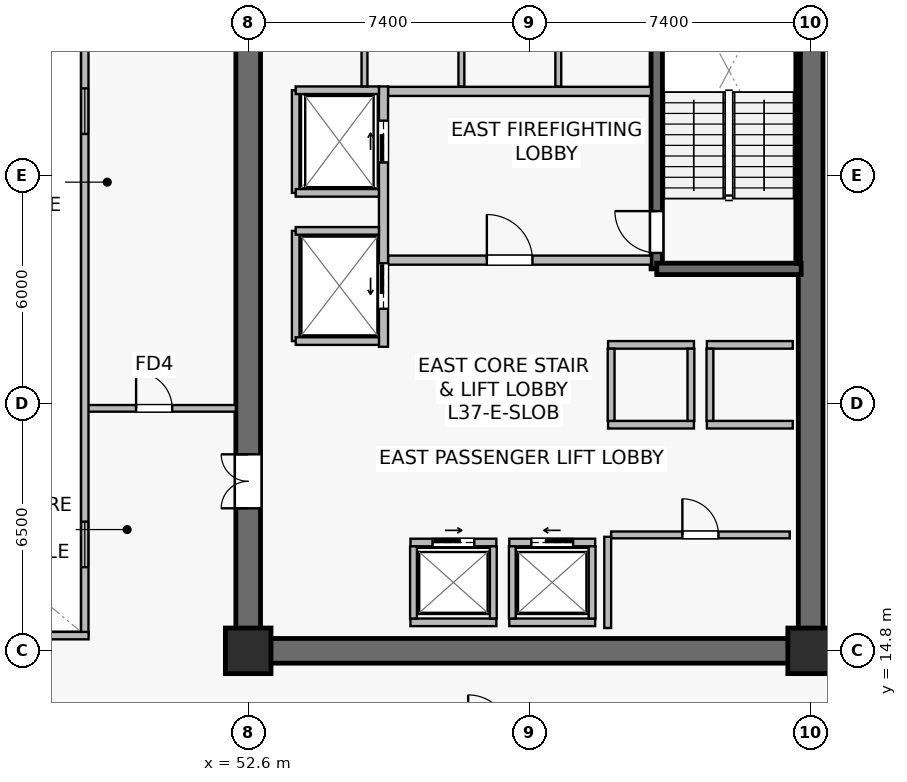
"""IFC4 building model, lengths in metres.
Left out: names, types, materials, properties, quantities, classifications, styles, units other than length and angle.
Written with IfcOpenShell. Run it as: python <this file> out.ifc"""

import sys

from ifc_helpers import new_model, si_unit, direction, frame, frame_2d, origin, origin_2d, place, context, subcontext, project, spatial, rectangle, extrude, source, transform, mapped, element, fill, save


model = new_model("IFC4")
c1 = context("Model", 3, precision=1e-05, world=origin(), true_north=direction((0.0, 1.0)))
c2 = subcontext(c1, "Body", "Model", "MODEL_VIEW")
j1 = project(units=[si_unit("LENGTHUNIT", "METRE"), si_unit("PLANEANGLEUNIT", "RADIAN")], contexts=[c1])
p1 = place(None, origin())
s1 = spatial("IfcSite", under=j1, at=p1, CompositionType="ELEMENT")
p2 = place(p1, origin())
s2 = spatial("IfcBuilding", under=s1, at=p2, CompositionType="ELEMENT")
p3 = place(p2, frame((0.0, 0.0, 154.3)))
s3 = spatial("IfcBuildingStorey", under=s2, at=p3, CompositionType="ELEMENT", Elevation=154.3)
p4 = place(p3, frame((52.275, 14.8, 0.0), z_axis=(0.0, 0.0, 1.0), x_axis=(1.0, 0.0, 0.0)))
e1 = element("IfcWall", 1, at=p4, inside=s3, PredefinedType="SHEAR", context=c2, shape_type="SweptSolid", body=[
    extrude(rectangle(XDim=15.45, YDim=0.65, at=frame_2d((7.725, 0.0))), origin(), (0.0, 0.0, 1.0), 3.79),
])
p5 = place(p3, frame((52.6, 15.125, 0.0), z_axis=(0.0, 0.0, 1.0), x_axis=(0.0, 1.0, 0.0)))
e2 = element("IfcWall", 2, at=p5, inside=s3, PredefinedType="SHEAR", context=c2, shape_type="SweptSolid", body=[
    extrude(rectangle(XDim=18.35, YDim=0.65, at=frame_2d((9.175, 0.0))), origin(), (0.0, 0.0, 1.0), 3.79),
])
p6 = place(p5, frame((3.425, 0.0, 0.0)))
e3 = element("IfcOpeningElement", 3, at=p6, cuts=e2, PredefinedType="OPENING", context=c2, shape_type="SweptSolid", body=[
    extrude(rectangle(XDim=1.42, YDim=2.2, at=frame_2d((0.71, 1.1))), frame((0.0, 0.335, 0.0), z_axis=(0.0, -1.0, 0.0), x_axis=(1.0, 0.0, 0.0)), (0.0, 0.0, 1.0), 0.67),
])
p7 = place(p3, frame((67.4, 15.125, 0.0), z_axis=(0.0, 0.0, 1.0), x_axis=(0.0, 1.0, 0.0)))
e4 = element("IfcWall", 4, at=p7, inside=s3, PredefinedType="SHEAR", context=c2, shape_type="SweptSolid", body=[
    extrude(rectangle(XDim=18.35, YDim=0.65, at=frame_2d((9.175, 0.0))), origin(), (0.0, 0.0, 1.0), 3.79),
])
p8 = place(p3, frame((63.35, 24.85, 0.0), z_axis=(0.0, 0.0, 1.0), x_axis=(0.0, 1.0, 0.0)))
e5 = element("IfcWall", 5, at=p8, inside=s3, PredefinedType="SHEAR", context=c2, shape_type="SweptSolid", body=[
    extrude(rectangle(XDim=8.63, YDim=0.3, at=frame_2d((4.315, 0.0))), origin(), (0.0, 0.0, 1.0), 3.79),
])
p9 = place(p8, frame((0.42, 0.0, 0.0)))
e6 = element("IfcOpeningElement", 6, at=p9, cuts=e5, PredefinedType="OPENING", context=c2, shape_type="SweptSolid", body=[
    extrude(rectangle(XDim=1.1, YDim=2.15, at=frame_2d((0.55, 1.075))), frame((0.0, 0.16, 0.0), z_axis=(0.0, -1.0, 0.0), x_axis=(1.0, 0.0, 0.0)), (0.0, 0.0, 1.0), 0.32),
])
p10 = place(p3, frame((63.35, 24.85, 0.0), z_axis=(0.0, 0.0, 1.0), x_axis=(1.0, 0.0, 0.0)))
e7 = element("IfcWall", 7, at=p10, inside=s3, PredefinedType="SHEAR", context=c2, shape_type="SweptSolid", body=[
    extrude(rectangle(XDim=3.8, YDim=0.3, at=frame_2d((1.9, 0.0))), origin(), (0.0, 0.0, 1.0), 3.79),
])
p11 = place(p3, frame((67.07, 25.0, 0.0), z_axis=(0.0, 0.0, 1.0), x_axis=(0.0, 1.0, 0.0)))
e8 = element("IfcWall", 8, at=p11, inside=s3, PredefinedType="SOLIDWALL", context=c2, shape_type="SweptSolid", body=[
    extrude(rectangle(XDim=8.32, YDim=0.12, at=frame_2d((4.16, 0.0))), origin(), (0.0, 0.0, 1.0), 3.79),
])
m1 = source(origin(), c2, "Body", "SweptSolid", [
    extrude(rectangle(XDim=1.2, YDim=1.2, at=origin_2d()), origin(), (0.0, 0.0, 1.0), 4.1),
])
for number, where, z_axis, x_axis in (
    (9, (52.6, 14.8, 0.0), (0.0, 0.0, 1.0), (1.0, 0.0, 0.0)),
    (10, (67.4, 14.8, 0.0), (0.0, 0.0, 1.0), (1.0, 0.0, 0.0)),
):
    element("IfcColumn", number, at=place(p3, frame(where, z_axis=z_axis, x_axis=x_axis)), inside=s3, PredefinedType="COLUMN", context=c2, shape_type="MappedRepresentation", body=[
        mapped(m1, transform((0.0, 0.0, 0.0), scale=1.0)),
    ])
p12 = place(p3, frame((56.28, 25.08, 0.0), z_axis=(0.0, 0.0, 1.0), x_axis=(1.0, 0.0, 0.0)))
e11 = element("IfcWall", 11, at=p12, inside=s3, PredefinedType="SOLIDWALL", context=c2, shape_type="SweptSolid", body=[
    extrude(rectangle(XDim=6.92, YDim=0.24, at=frame_2d((3.46, 0.0))), origin(), (0.0, 0.0, 1.0), 3.187),
])
p13 = place(p12, frame((2.6, 0.0, 0.0)))
e12 = element("IfcOpeningElement", 12, at=p13, cuts=e11, PredefinedType="OPENING", context=c2, shape_type="SweptSolid", body=[
    extrude(rectangle(XDim=1.2, YDim=2.16, at=frame_2d((0.6, 1.08))), frame((0.0, 0.13, 0.0), z_axis=(0.0, -1.0, 0.0), x_axis=(1.0, 0.0, 0.0)), (0.0, 0.0, 1.0), 0.26),
])
p14 = place(p3, frame((56.28, 29.52, 0.0), z_axis=(0.0, 0.0, 1.0), x_axis=(1.0, 0.0, 0.0)))
e13 = element("IfcWall", 13, at=p14, inside=s3, PredefinedType="SOLIDWALL", context=c2, shape_type="SweptSolid", body=[
    extrude(rectangle(XDim=6.92, YDim=0.24, at=frame_2d((3.46, 0.0))), origin(), (0.0, 0.0, 1.0), 3.187),
])
p15 = place(p3, frame((56.16, 22.8, 0.0), z_axis=(0.0, 0.0, 1.0), x_axis=(0.0, 1.0, 0.0)))
e14 = element("IfcWall", 14, at=p15, inside=s3, PredefinedType="SOLIDWALL", context=c2, shape_type="SweptSolid", body=[
    extrude(rectangle(XDim=6.85, YDim=0.24, at=frame_2d((3.425, 0.0))), origin(), (0.0, 0.0, 1.0), 2.875),
])
p16 = place(p15, frame((4.85, 0.0, 0.0)))
e15 = element("IfcOpeningElement", 15, at=p16, cuts=e14, PredefinedType="OPENING", context=c2, shape_type="SweptSolid", body=[
    extrude(rectangle(XDim=1.1, YDim=2.22, at=frame_2d((0.55, 1.11))), frame((0.0, 0.13, 0.0), z_axis=(0.0, -1.0, 0.0), x_axis=(1.0, 0.0, 0.0)), (0.0, 0.0, 1.0), 0.26),
])
p17 = place(p15, frame((1.0, 0.0, 0.0)))
e16 = element("IfcOpeningElement", 16, at=p17, cuts=e14, PredefinedType="OPENING", context=c2, shape_type="SweptSolid", body=[
    extrude(rectangle(XDim=1.2, YDim=2.22, at=frame_2d((0.6, 1.11))), frame((0.0, 0.13, 0.0), z_axis=(0.0, -1.0, 0.0), x_axis=(1.0, 0.0, 0.0)), (0.0, 0.0, 1.0), 0.26),
])
p18 = place(p3, frame((59.47, 17.65, 0.0), z_axis=(0.0, 0.0, 1.0), x_axis=(1.0, 0.0, 0.0)))
e17 = element("IfcWall", 17, at=p18, inside=s3, PredefinedType="SOLIDWALL", context=c2, shape_type="SweptSolid", body=[
    extrude(rectangle(XDim=2.26, YDim=0.2, at=frame_2d((1.13, 0.0))), origin(), (0.0, 0.0, 1.0), 3.187),
])
p19 = place(p18, frame((0.58, 0.0, 0.0)))
e18 = element("IfcOpeningElement", 18, at=p19, cuts=e17, PredefinedType="OPENING", context=c2, shape_type="SweptSolid", body=[
    extrude(rectangle(XDim=1.1, YDim=2.22, at=frame_2d((0.55, 1.11))), frame((0.0, 0.11, 0.0), z_axis=(0.0, -1.0, 0.0), x_axis=(1.0, 0.0, 0.0)), (0.0, 0.0, 1.0), 0.22),
])
p20 = place(p3, frame((59.47, 15.55, 0.0), z_axis=(0.0, 0.0, 1.0), x_axis=(1.0, 0.0, 0.0)))
e19 = element("IfcWall", 19, at=p20, inside=s3, PredefinedType="SOLIDWALL", context=c2, shape_type="SweptSolid", body=[
    extrude(rectangle(XDim=2.26, YDim=0.2, at=frame_2d((1.13, 0.0))), origin(), (0.0, 0.0, 1.0), 3.187),
])
for number, where, z_axis, x_axis in (
    (20, (59.55, 15.65, 0.0), (0.0, 0.0, 1.0), (0.0, 1.0, 0.0)),
    (21, (61.65, 15.65, 0.0), (0.0, 0.0, 1.0), (0.0, 1.0, 0.0)),
):
    element("IfcWall", number, at=place(p3, frame(where, z_axis=z_axis, x_axis=x_axis)), inside=s3, PredefinedType="SOLIDWALL", context=c2, shape_type="SweptSolid", body=[
        extrude(rectangle(XDim=1.9, YDim=0.18, at=frame_2d((0.95, 0.0))), origin(), (0.0, 0.0, 1.0), 3.79),
    ])
p21 = place(p3, frame((56.87, 17.65, 0.0), z_axis=(0.0, 0.0, 1.0), x_axis=(1.0, 0.0, 0.0)))
e22 = element("IfcWall", 22, at=p21, inside=s3, PredefinedType="SOLIDWALL", context=c2, shape_type="SweptSolid", body=[
    extrude(rectangle(XDim=2.26, YDim=0.2, at=frame_2d((1.13, 0.0))), origin(), (0.0, 0.0, 1.0), 3.79),
])
p22 = place(p21, frame((0.58, 0.0, 0.0)))
e23 = element("IfcOpeningElement", 23, at=p22, cuts=e22, PredefinedType="OPENING", context=c2, shape_type="SweptSolid", body=[
    extrude(rectangle(XDim=1.1, YDim=2.22, at=frame_2d((0.55, 1.11))), frame((0.0, 0.11, 0.0), z_axis=(0.0, -1.0, 0.0), x_axis=(1.0, 0.0, 0.0)), (0.0, 0.0, 1.0), 0.22),
])
p23 = place(p3, frame((56.87, 15.55, 0.0), z_axis=(0.0, 0.0, 1.0), x_axis=(1.0, 0.0, 0.0)))
e24 = element("IfcWall", 24, at=p23, inside=s3, PredefinedType="SOLIDWALL", context=c2, shape_type="SweptSolid", body=[
    extrude(rectangle(XDim=2.26, YDim=0.2, at=frame_2d((1.13, 0.0))), origin(), (0.0, 0.0, 1.0), 3.79),
])
for number, where, z_axis, x_axis in (
    (25, (56.95, 15.65, 0.0), (0.0, 0.0, 1.0), (0.0, 1.0, 0.0)),
    (26, (59.05, 15.65, 0.0), (0.0, 0.0, 1.0), (0.0, 1.0, 0.0)),
):
    element("IfcWall", number, at=place(p3, frame(where, z_axis=z_axis, x_axis=x_axis)), inside=s3, PredefinedType="SOLIDWALL", context=c2, shape_type="SweptSolid", body=[
        extrude(rectangle(XDim=1.9, YDim=0.18, at=frame_2d((0.95, 0.0))), origin(), (0.0, 0.0, 1.0), 3.79),
    ])
for number, where, z_axis, x_axis in (
    (27, (64.67, 20.75, 0.0), (0.0, 0.0, 1.0), (1.0, 0.0, 0.0)),
    (28, (64.67, 22.85, 0.0), (0.0, 0.0, 1.0), (1.0, 0.0, 0.0)),
):
    element("IfcWall", number, at=place(p3, frame(where, z_axis=z_axis, x_axis=x_axis)), inside=s3, PredefinedType="SOLIDWALL", context=c2, shape_type="SweptSolid", body=[
        extrude(rectangle(XDim=2.26, YDim=0.2, at=frame_2d((1.13, 0.0))), origin(), (0.0, 0.0, 1.0), 3.79),
    ])
p24 = place(p3, frame((64.75, 20.85, 0.0), z_axis=(0.0, 0.0, 1.0), x_axis=(0.0, 1.0, 0.0)))
e29 = element("IfcWall", 29, at=p24, inside=s3, PredefinedType="SOLIDWALL", context=c2, shape_type="SweptSolid", body=[
    extrude(rectangle(XDim=1.9, YDim=0.18, at=frame_2d((0.95, 0.0))), origin(), (0.0, 0.0, 1.0), 3.79),
])
for number, where, z_axis, x_axis in (
    (30, (62.07, 20.75, 0.0), (0.0, 0.0, 1.0), (1.0, 0.0, 0.0)),
    (31, (62.07, 22.85, 0.0), (0.0, 0.0, 1.0), (1.0, 0.0, 0.0)),
):
    element("IfcWall", number, at=place(p3, frame(where, z_axis=z_axis, x_axis=x_axis)), inside=s3, PredefinedType="SOLIDWALL", context=c2, shape_type="SweptSolid", body=[
        extrude(rectangle(XDim=2.26, YDim=0.2, at=frame_2d((1.13, 0.0))), origin(), (0.0, 0.0, 1.0), 3.79),
    ])
for number, where, z_axis, x_axis in (
    (32, (62.15, 20.85, 0.0), (0.0, 0.0, 1.0), (0.0, 1.0, 0.0)),
    (33, (64.25, 20.85, 0.0), (0.0, 0.0, 1.0), (0.0, 1.0, 0.0)),
):
    element("IfcWall", number, at=place(p3, frame(where, z_axis=z_axis, x_axis=x_axis)), inside=s3, PredefinedType="SOLIDWALL", context=c2, shape_type="SweptSolid", body=[
        extrude(rectangle(XDim=1.9, YDim=0.18, at=frame_2d((0.95, 0.0))), origin(), (0.0, 0.0, 1.0), 3.79),
    ])
p25 = place(p3, frame((53.85, 26.85, 0.0), z_axis=(0.0, 0.0, 1.0), x_axis=(0.0, 1.0, 0.0)))
e34 = element("IfcWall", 34, at=p25, inside=s3, PredefinedType="SOLIDWALL", context=c2, shape_type="SweptSolid", body=[
    extrude(rectangle(XDim=2.7, YDim=0.2, at=frame_2d((1.35, 0.0))), origin(), (0.0, 0.0, 1.0), 3.79),
])
p26 = place(p3, frame((53.85, 29.55, 0.0), z_axis=(0.0, 0.0, 1.0), x_axis=(1.0, 0.0, 0.0)))
e35 = element("IfcWall", 35, at=p26, inside=s3, PredefinedType="SOLIDWALL", context=c2, shape_type="SweptSolid", body=[
    extrude(rectangle(XDim=2.19, YDim=0.2, at=frame_2d((1.095, 0.0))), origin(), (0.0, 0.0, 1.0), 3.79),
])
p27 = place(p3, frame((53.85, 26.85, 0.0), z_axis=(0.0, 0.0, 1.0), x_axis=(1.0, 0.0, 0.0)))
e36 = element("IfcWall", 36, at=p27, inside=s3, PredefinedType="SOLIDWALL", context=c2, shape_type="SweptSolid", body=[
    extrude(rectangle(XDim=2.19, YDim=0.2, at=frame_2d((1.095, 0.0))), origin(), (0.0, 0.0, 1.0), 3.187),
])
p28 = place(p3, frame((53.85, 22.95, 0.0), z_axis=(0.0, 0.0, 1.0), x_axis=(0.0, 1.0, 0.0)))
e37 = element("IfcWall", 37, at=p28, inside=s3, PredefinedType="SOLIDWALL", context=c2, shape_type="SweptSolid", body=[
    extrude(rectangle(XDim=2.9, YDim=0.2, at=frame_2d((1.45, 0.0))), origin(), (0.0, 0.0, 1.0), 2.875),
])
for number, where, z_axis, x_axis in (
    (38, (53.85, 25.85, 0.0), (0.0, 0.0, 1.0), (1.0, 0.0, 0.0)),
    (39, (53.85, 22.95, 0.0), (0.0, 0.0, 1.0), (1.0, 0.0, 0.0)),
):
    element("IfcWall", number, at=place(p3, frame(where, z_axis=z_axis, x_axis=x_axis)), inside=s3, PredefinedType="SOLIDWALL", context=c2, shape_type="SweptSolid", body=[
        extrude(rectangle(XDim=2.19, YDim=0.2, at=frame_2d((1.095, 0.0))), origin(), (0.0, 0.0, 1.0), 3.79),
    ])
p29 = place(p3, frame((62.15, 17.85, 0.0), z_axis=(0.0, 0.0, 1.0), x_axis=(1.0, 0.0, 0.0)))
e40 = element("IfcWall", 40, at=p29, inside=s3, PredefinedType="SOLIDWALL", context=c2, shape_type="SweptSolid", body=[
    extrude(rectangle(XDim=4.7, YDim=0.18, at=frame_2d((2.35, 0.0))), origin(), (0.0, 0.0, 1.0), 3.79),
])
p30 = place(p29, frame((1.875, 0.0, 0.0)))
e41 = element("IfcOpeningElement", 41, at=p30, cuts=e40, PredefinedType="OPENING", context=c2, shape_type="SweptSolid", body=[
    extrude(rectangle(XDim=0.95, YDim=2.15, at=frame_2d((0.475, 1.075))), frame((0.0, 0.1, 0.0), z_axis=(0.0, -1.0, 0.0), x_axis=(1.0, 0.0, 0.0)), (0.0, 0.0, 1.0), 0.2),
])
p31 = place(p3, frame((62.06, 15.4, 0.0), z_axis=(0.0, 0.0, 1.0), x_axis=(0.0, 1.0, 0.0)))
e42 = element("IfcWall", 42, at=p31, inside=s3, PredefinedType="SOLIDWALL", context=c2, shape_type="SweptSolid", body=[
    extrude(rectangle(XDim=2.4, YDim=0.18, at=frame_2d((1.2, 0.0))), origin(), (0.0, 0.0, 1.0), 3.79),
])
for number, where, z_axis, x_axis in (
    (43, (60.76, 29.65, 0.0), (0.0, 0.0, 1.0), (0.0, 1.0, 0.0)),
    (44, (58.21, 29.65, 0.0), (0.0, 0.0, 1.0), (0.0, 1.0, 0.0)),
    (45, (55.66, 29.65, 0.0), (0.0, 0.0, 1.0), (0.0, 1.0, 0.0)),
):
    element("IfcWall", number, at=place(p3, frame(where, z_axis=z_axis, x_axis=x_axis)), inside=s3, PredefinedType="PLUMBINGWALL", context=c2, shape_type="SweptSolid", body=[
        extrude(rectangle(XDim=3.93, YDim=0.155, at=frame_2d((1.965, 0.0))), origin(), (0.0, 0.0, 1.0), 3.79),
    ])
p32 = place(p3, frame((48.3, 21.18, 0.0), z_axis=(0.0, 0.0, 1.0), x_axis=(1.0, 0.0, 0.0)))
e46 = element("IfcWall", 46, at=p32, inside=s3, PredefinedType="PARTITIONING", context=c2, shape_type="SweptSolid", body=[
    extrude(rectangle(XDim=3.975, YDim=0.175, at=frame_2d((1.987, 0.0))), origin(), (0.0, 0.0, 1.0), 3.79),
])
p33 = place(p32, frame((1.35, 0.0, 0.0)))
e47 = element("IfcOpeningElement", 47, at=p33, cuts=e46, PredefinedType="OPENING", context=c2, shape_type="SweptSolid", body=[
    extrude(rectangle(XDim=0.95, YDim=2.15, at=frame_2d((0.475, 1.075))), frame((0.0, 0.098, 0.0), z_axis=(0.0, -1.0, 0.0), x_axis=(1.0, 0.0, 0.0)), (0.0, 0.0, 1.0), 0.195),
])
p34 = place(p3, frame((48.3, 15.2, 0.0), z_axis=(0.0, 0.0, 1.0), x_axis=(0.0, 1.0, 0.0)))
e48 = element("IfcWall", 48, at=p34, inside=s3, PredefinedType="SOLIDWALL", context=c2, shape_type="SweptSolid", body=[
    extrude(rectangle(XDim=18.2, YDim=0.195, at=frame_2d((9.1, 0.0))), origin(), (0.0, 0.0, 1.0), 3.79),
])
p35 = place(p34, frame((1.8, 0.0, 0.9)))
e49 = element("IfcOpeningElement", 49, at=p35, cuts=e48, PredefinedType="OPENING", context=c2, shape_type="SweptSolid", body=[
    extrude(rectangle(XDim=1.2, YDim=1.35, at=frame_2d((0.6, 0.675))), frame((0.0, 0.107, 0.0), z_axis=(0.0, -1.0, 0.0), x_axis=(1.0, 0.0, 0.0)), (0.0, 0.0, 1.0), 0.215),
])
p36 = place(p34, frame((13.2, 0.0, 0.9)))
e50 = element("IfcOpeningElement", 50, at=p36, cuts=e48, PredefinedType="OPENING", context=c2, shape_type="SweptSolid", body=[
    extrude(rectangle(XDim=1.2, YDim=1.35, at=frame_2d((0.6, 0.675))), frame((0.0, 0.107, 0.0), z_axis=(0.0, -1.0, 0.0), x_axis=(1.0, 0.0, 0.0)), (0.0, 0.0, 1.0), 0.215),
])
p37 = place(p3, frame((26.4, 15.2, 0.0), z_axis=(0.0, 0.0, 1.0), x_axis=(1.0, 0.0, 0.0)))
e51 = element("IfcWall", 51, at=p37, inside=s3, PredefinedType="SOLIDWALL", context=c2, shape_type="SweptSolid", body=[
    extrude(rectangle(XDim=22.0, YDim=0.195, at=frame_2d((11.0, 0.0))), origin(), (0.0, 0.0, 1.0), 3.79),
])
m2 = source(origin(), c2, "Body", "SweptSolid", [
    extrude(rectangle(XDim=1.2, YDim=1.35, at=frame_2d((0.6, 0.675))), frame((0.0, 0.03, 0.0), z_axis=(0.0, -1.0, 0.0), x_axis=(1.0, 0.0, 0.0)), (0.0, 0.0, 1.0), 0.06),
])
p38 = place(p35, origin())
e52 = element("IfcWindow", 52, at=p38, inside=s3, PartitioningType="SINGLE_PANEL", PredefinedType="WINDOW", context=c2, shape_type="MappedRepresentation", body=[
    mapped(m2, transform((0.0, 0.0, 0.0), scale=1.0)),
])
fill(e49, e52)
p39 = place(p36, origin())
e53 = element("IfcWindow", 53, at=p39, inside=s3, PartitioningType="SINGLE_PANEL", PredefinedType="WINDOW", context=c2, shape_type="MappedRepresentation", body=[
    mapped(m2, transform((0.0, 0.0, 0.0), scale=1.0)),
])
fill(e50, e53)
m3 = source(origin(), c2, "Body", "SweptSolid", [
    extrude(rectangle(XDim=1.1, YDim=2.15, at=frame_2d((0.55, 1.075))), frame((0.0, 0.025, 0.0), z_axis=(0.0, -1.0, 0.0), x_axis=(1.0, 0.0, 0.0)), (0.0, 0.0, 1.0), 0.05),
])
p40 = place(p9, origin())
e54 = element("IfcDoor", 54, at=p40, inside=s3, OperationType="SINGLE_SWING_RIGHT", PredefinedType="DOOR", context=c2, shape_type="MappedRepresentation", body=[
    mapped(m3, transform((0.0, 0.0, 0.0), scale=1.0)),
])
fill(e6, e54)
m4 = source(origin(), c2, "Body", "SweptSolid", [
    extrude(rectangle(XDim=1.2, YDim=2.16, at=frame_2d((0.6, 1.08))), frame((0.0, 0.025, 0.0), z_axis=(0.0, -1.0, 0.0), x_axis=(1.0, 0.0, 0.0)), (0.0, 0.0, 1.0), 0.05),
])
p41 = place(p13, origin())
e55 = element("IfcDoor", 55, at=p41, inside=s3, OperationType="SINGLE_SWING_LEFT", PredefinedType="DOOR", context=c2, shape_type="MappedRepresentation", body=[
    mapped(m4, transform((0.0, 0.0, 0.0), scale=1.0)),
])
fill(e12, e55)
m5 = source(origin(), c2, "Body", "SweptSolid", [
    extrude(rectangle(XDim=1.1, YDim=2.22, at=frame_2d((0.55, 1.11))), frame((0.0, 0.025, 0.0), z_axis=(0.0, -1.0, 0.0), x_axis=(1.0, 0.0, 0.0)), (0.0, 0.0, 1.0), 0.05),
])
p42 = place(p19, origin())
e56 = element("IfcDoor", 56, at=p42, inside=s3, OperationType="SLIDING_TO_LEFT", PredefinedType="USERDEFINED", context=c2, shape_type="MappedRepresentation", body=[
    mapped(m5, transform((0.0, 0.0, 0.0), scale=1.0)),
])
fill(e18, e56)
p43 = place(p22, origin())
e57 = element("IfcDoor", 57, at=p43, inside=s3, OperationType="SLIDING_TO_RIGHT", PredefinedType="USERDEFINED", context=c2, shape_type="MappedRepresentation", body=[
    mapped(m5, transform((0.0, 0.0, 0.0), scale=1.0)),
])
fill(e23, e57)
p44 = place(p16, origin())
e58 = element("IfcDoor", 58, at=p44, inside=s3, OperationType="SLIDING_TO_RIGHT", PredefinedType="USERDEFINED", context=c2, shape_type="MappedRepresentation", body=[
    mapped(m5, transform((0.0, 0.0, 0.0), scale=1.0)),
])
fill(e15, e58)
m6 = source(origin(), c2, "Body", "SweptSolid", [
    extrude(rectangle(XDim=1.2, YDim=2.22, at=frame_2d((0.6, 1.11))), frame((0.0, 0.025, 0.0), z_axis=(0.0, -1.0, 0.0), x_axis=(1.0, 0.0, 0.0)), (0.0, 0.0, 1.0), 0.05),
])
p45 = place(p17, origin())
e59 = element("IfcDoor", 59, at=p45, inside=s3, OperationType="SLIDING_TO_LEFT", PredefinedType="USERDEFINED", context=c2, shape_type="MappedRepresentation", body=[
    mapped(m6, transform((0.0, 0.0, 0.0), scale=1.0)),
])
fill(e16, e59)
m7 = source(origin(), c2, "Body", "SweptSolid", [
    extrude(rectangle(XDim=0.95, YDim=2.15, at=frame_2d((0.475, 1.075))), frame((0.0, 0.025, 0.0), z_axis=(0.0, -1.0, 0.0), x_axis=(1.0, 0.0, 0.0)), (0.0, 0.0, 1.0), 0.05),
])
p46 = place(p30, origin())
e60 = element("IfcDoor", 60, at=p46, inside=s3, OperationType="SINGLE_SWING_LEFT", PredefinedType="DOOR", context=c2, shape_type="MappedRepresentation", body=[
    mapped(m7, transform((0.0, 0.0, 0.0), scale=1.0)),
])
fill(e41, e60)
m8 = source(origin(), c2, "Body", "SweptSolid", [
    extrude(rectangle(XDim=1.42, YDim=2.2, at=frame_2d((0.71, 1.1))), frame((0.0, 0.025, 0.0), z_axis=(0.0, -1.0, 0.0), x_axis=(1.0, 0.0, 0.0)), (0.0, 0.0, 1.0), 0.05),
])
p47 = place(p6, origin())
e61 = element("IfcDoor", 61, at=p47, inside=s3, OperationType="DOUBLE_DOOR_SINGLE_SWING", PredefinedType="DOOR", context=c2, shape_type="MappedRepresentation", body=[
    mapped(m8, transform((0.0, 0.0, 0.0), scale=1.0)),
])
fill(e3, e61)
p48 = place(p33, origin())
e62 = element("IfcDoor", 62, at=p48, inside=s3, OperationType="SINGLE_SWING_LEFT", PredefinedType="DOOR", context=c2, shape_type="MappedRepresentation", body=[
    mapped(m7, transform((0.0, 0.0, 0.0), scale=1.0)),
])
fill(e47, e62)
save(model, sys.argv[1])
